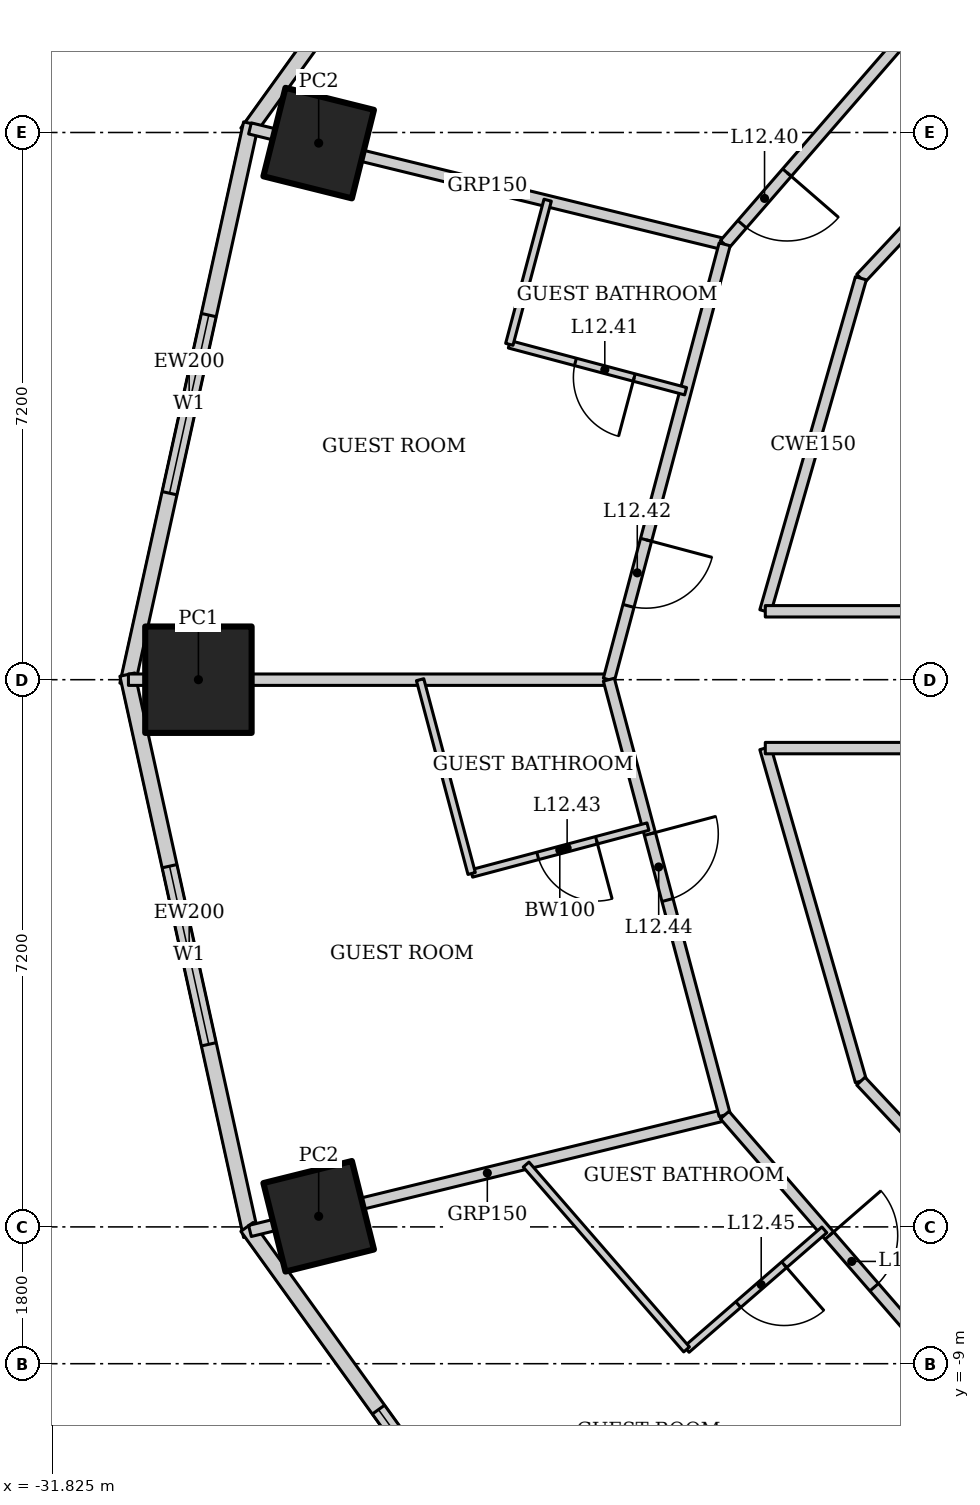
"""IFC4 building model, lengths in metres.
Left out: names, types, materials, properties, quantities, classifications, styles, units other than length and angle.
Written with IfcOpenShell. Run it as: python <this file> out.ifc"""

import sys

from ifc_helpers import new_model, si_unit, direction, frame, frame_2d, origin, origin_2d, place, context, subcontext, project, spatial, rectangle, hollow_rectangle, extrude, element, fill, save


model = new_model("IFC4")
c1 = context("Model", 3, precision=1e-05, world=origin(), true_north=direction((0.0, 1.0)))
c2 = subcontext(c1, "Body", "Model", "MODEL_VIEW")
j1 = project(units=[si_unit("LENGTHUNIT", "METRE"), si_unit("PLANEANGLEUNIT", "RADIAN")], contexts=[c1])
p1 = place(None, origin())
s1 = spatial("IfcSite", under=j1, at=p1, CompositionType="ELEMENT")
p2 = place(p1, origin())
s2 = spatial("IfcBuilding", under=s1, at=p2, CompositionType="ELEMENT")
p3 = place(p2, frame((0.0, 0.0, 58.6)))
s3 = spatial("IfcBuildingStorey", under=s2, at=p3, CompositionType="ELEMENT", Elevation=58.6)
p4 = place(p3, frame((-28.318, 7.06, 0.0), z_axis=(0.0, 0.0, 1.0), x_axis=(0.2419218956, 0.970295726276, 0.0)))
e1 = element("IfcColumn", 1, at=p4, inside=s3, PredefinedType="COLUMN", context=c2, shape_type="SweptSolid", body=[
    extrude(hollow_rectangle(XDim=1.2, YDim=1.2, WallThickness=0.1, at=origin_2d()), origin(), (0.0, 0.0, 1.0), 3.6),
])
p5 = place(p3, frame((-29.9, 0.0, 0.0), z_axis=(0.0, 0.0, 1.0), x_axis=(1.0, 0.0, 0.0)))
e2 = element("IfcColumn", 2, at=p5, inside=s3, PredefinedType="COLUMN", context=c2, shape_type="SweptSolid", body=[
    extrude(hollow_rectangle(XDim=1.4, YDim=1.4, WallThickness=0.1, at=origin_2d()), origin(), (0.0, 0.0, 1.0), 3.6),
])
p6 = place(p3, frame((-28.318, -7.06, 0.0), z_axis=(0.0, 0.0, 1.0), x_axis=(0.970295726276, 0.2419218956, 0.0)))
e3 = element("IfcColumn", 3, at=p6, inside=s3, PredefinedType="COLUMN", context=c2, shape_type="SweptSolid", body=[
    extrude(hollow_rectangle(XDim=1.2, YDim=1.2, WallThickness=0.1, at=origin_2d()), origin(), (0.0, 0.0, 1.0), 3.6),
])
p7 = place(p3, frame((-24.4, 13.957, 0.0), z_axis=(0.0, 0.0, 1.0), x_axis=(-0.583937613703, -0.811798536155, 0.0)))
e4 = element("IfcWall", 4, at=p7, inside=s3, PredefinedType="SOLIDWALL", context=c2, shape_type="SweptSolid", body=[
    extrude(rectangle(XDim=8.323, YDim=0.2, at=frame_2d((4.162, 0.0))), origin(), (0.0, 0.0, 1.0), 3.45),
])
p8 = place(p7, frame((2.961, 0.0, 0.5)))
e5 = element("IfcOpeningElement", 5, at=p8, cuts=e4, PredefinedType="OPENING", context=c2, shape_type="SweptSolid", body=[
    extrude(rectangle(XDim=2.4, YDim=2.2, at=frame_2d((1.2, 1.1))), frame((0.0, 0.11, 0.0), z_axis=(0.0, -1.0, 0.0), x_axis=(1.0, 0.0, 0.0)), (0.0, 0.0, 1.0), 0.22),
])
p9 = place(p3, frame((-29.208, 7.318, 0.0), z_axis=(0.0, 0.0, 1.0), x_axis=(-0.215238065514, -0.976561608478, 0.0)))
e6 = element("IfcWall", 6, at=p9, inside=s3, PredefinedType="SOLIDWALL", context=c2, shape_type="SweptSolid", body=[
    extrude(rectangle(XDim=7.562, YDim=0.2, at=frame_2d((3.781, 0.0))), origin(), (0.0, 0.0, 1.0), 3.45),
])
p10 = place(p9, frame((2.581, 0.0, 0.5)))
e7 = element("IfcOpeningElement", 7, at=p10, cuts=e6, PredefinedType="OPENING", context=c2, shape_type="SweptSolid", body=[
    extrude(rectangle(XDim=2.4, YDim=2.2, at=frame_2d((1.2, 1.1))), frame((0.0, 0.11, 0.0), z_axis=(0.0, -1.0, 0.0), x_axis=(1.0, 0.0, 0.0)), (0.0, 0.0, 1.0), 0.22),
])
p11 = place(p3, frame((-30.835, 0.067, 0.0), z_axis=(0.0, 0.0, 1.0), x_axis=(0.215238065514, -0.976561608478, 0.0)))
e8 = element("IfcWall", 8, at=p11, inside=s3, PredefinedType="SOLIDWALL", context=c2, shape_type="SweptSolid", body=[
    extrude(rectangle(XDim=7.562, YDim=0.2, at=frame_2d((3.781, 0.0))), origin(), (0.0, 0.0, 1.0), 3.45),
])
p12 = place(p11, frame((2.581, 0.0, 0.5)))
e9 = element("IfcOpeningElement", 9, at=p12, cuts=e8, PredefinedType="OPENING", context=c2, shape_type="SweptSolid", body=[
    extrude(rectangle(XDim=2.4, YDim=2.2, at=frame_2d((1.2, 1.1))), frame((0.0, 0.11, 0.0), z_axis=(0.0, -1.0, 0.0), x_axis=(1.0, 0.0, 0.0)), (0.0, 0.0, 1.0), 0.22),
])
p13 = place(p3, frame((-29.26, -7.2, 0.0), z_axis=(0.0, 0.0, 1.0), x_axis=(0.583937613703, -0.811798536155, 0.0)))
e10 = element("IfcWall", 10, at=p13, inside=s3, PredefinedType="SOLIDWALL", context=c2, shape_type="SweptSolid", body=[
    extrude(rectangle(XDim=8.323, YDim=0.2, at=frame_2d((4.162, 0.0))), origin(), (0.0, 0.0, 1.0), 3.45),
])
p14 = place(p13, frame((2.961, 0.0, 0.5)))
e11 = element("IfcOpeningElement", 11, at=p14, cuts=e10, PredefinedType="OPENING", context=c2, shape_type="SweptSolid", body=[
    extrude(rectangle(XDim=2.4, YDim=2.2, at=frame_2d((1.2, 1.1))), frame((0.0, 0.11, 0.0), z_axis=(0.0, -1.0, 0.0), x_axis=(1.0, 0.0, 0.0)), (0.0, 0.0, 1.0), 0.22),
])
p15 = place(p3, frame((-29.222, 7.254, 0.0), z_axis=(0.0, 0.0, 1.0), x_axis=(0.971456980633, -0.237215797913, 0.0)))
e12 = element("IfcWall", 12, at=p15, inside=s3, PredefinedType="PARTITIONING", context=c2, shape_type="SweptSolid", body=[
    extrude(rectangle(XDim=6.429, YDim=0.15, at=frame_2d((3.215, 0.0))), origin(), (0.0, 0.0, 1.0), 2.332),
])
p16 = place(p3, frame((-30.821, 0.0, 0.0), z_axis=(0.0, 0.0, 1.0), x_axis=(1.0, 0.0, 0.0)))
e13 = element("IfcWall", 13, at=p16, inside=s3, PredefinedType="PARTITIONING", context=c2, shape_type="SweptSolid", body=[
    extrude(rectangle(XDim=6.321, YDim=0.15, at=frame_2d((3.16, 0.0))), origin(), (0.0, 0.0, 1.0), 2.528),
])
p17 = place(p3, frame((-29.222, -7.254, 0.0), z_axis=(0.0, 0.0, 1.0), x_axis=(0.971456980633, 0.237215797913, 0.0)))
e14 = element("IfcWall", 14, at=p17, inside=s3, PredefinedType="PARTITIONING", context=c2, shape_type="SweptSolid", body=[
    extrude(rectangle(XDim=6.429, YDim=0.15, at=frame_2d((3.215, 0.0))), origin(), (0.0, 0.0, 1.0), 2.332),
])
p18 = place(p3, frame((-18.681, 10.675, 0.0), z_axis=(0.0, 0.0, 1.0), x_axis=(-0.655599989166, -0.755108372491, 0.0)))
e15 = element("IfcWall", 15, at=p18, inside=s3, PredefinedType="PARTITIONING", context=c2, shape_type="SweptSolid", body=[
    extrude(rectangle(XDim=6.551, YDim=0.15, at=frame_2d((3.275, 0.0))), origin(), (0.0, 0.0, 1.0), 3.45),
])
p19 = place(p18, frame((5.301, 0.0, 0.0)))
e16 = element("IfcOpeningElement", 16, at=p19, cuts=e15, PredefinedType="OPENING", context=c2, shape_type="SweptSolid", body=[
    extrude(rectangle(XDim=0.9, YDim=2.1, at=frame_2d((0.45, 1.05))), frame((0.0, 0.085, 0.0), z_axis=(0.0, -1.0, 0.0), x_axis=(1.0, 0.0, 0.0)), (0.0, 0.0, 1.0), 0.17),
])
p20 = place(p3, frame((-22.976, 5.729, 0.0), z_axis=(0.0, 0.0, 1.0), x_axis=(-0.257083265334, -0.966389256296, 0.0)))
e17 = element("IfcWall", 17, at=p20, inside=s3, PredefinedType="PARTITIONING", context=c2, shape_type="SweptSolid", body=[
    extrude(rectangle(XDim=5.928, YDim=0.15, at=frame_2d((2.964, 0.0))), origin(), (0.0, 0.0, 1.0), 3.45),
])
p21 = place(p20, frame((4.023, 0.0, 0.0)))
e18 = element("IfcOpeningElement", 18, at=p21, cuts=e17, PredefinedType="OPENING", context=c2, shape_type="SweptSolid", body=[
    extrude(rectangle(XDim=0.9, YDim=2.1, at=frame_2d((0.45, 1.05))), frame((0.0, 0.085, 0.0), z_axis=(0.0, -1.0, 0.0), x_axis=(1.0, 0.0, 0.0)), (0.0, 0.0, 1.0), 0.17),
])
p22 = place(p3, frame((-24.5, 0.0, 0.0), z_axis=(0.0, 0.0, 1.0), x_axis=(0.257083265334, -0.966389256296, 0.0)))
e19 = element("IfcWall", 19, at=p22, inside=s3, PredefinedType="PARTITIONING", context=c2, shape_type="SweptSolid", body=[
    extrude(rectangle(XDim=5.928, YDim=0.15, at=frame_2d((2.964, 0.0))), origin(), (0.0, 0.0, 1.0), 3.45),
])
p23 = place(p22, frame((2.1, 0.0, 0.0)))
e20 = element("IfcOpeningElement", 20, at=p23, cuts=e19, PredefinedType="OPENING", context=c2, shape_type="SweptSolid", body=[
    extrude(rectangle(XDim=0.9, YDim=2.1, at=frame_2d((0.45, 1.05))), frame((0.0, 0.085, 0.0), z_axis=(0.0, -1.0, 0.0), x_axis=(1.0, 0.0, 0.0)), (0.0, 0.0, 1.0), 0.17),
])
p24 = place(p3, frame((-22.976, -5.729, 0.0), z_axis=(0.0, 0.0, 1.0), x_axis=(0.655599989166, -0.755108372491, 0.0)))
e21 = element("IfcWall", 21, at=p24, inside=s3, PredefinedType="PARTITIONING", context=c2, shape_type="SweptSolid", body=[
    extrude(rectangle(XDim=6.551, YDim=0.15, at=frame_2d((3.275, 0.0))), origin(), (0.0, 0.0, 1.0), 3.45),
])
p25 = place(p24, frame((2.1, 0.0, 0.0)))
e22 = element("IfcOpeningElement", 22, at=p25, cuts=e21, PredefinedType="OPENING", context=c2, shape_type="SweptSolid", body=[
    extrude(rectangle(XDim=0.9, YDim=2.1, at=frame_2d((0.45, 1.05))), frame((0.0, 0.085, 0.0), z_axis=(0.0, -1.0, 0.0), x_axis=(1.0, 0.0, 0.0)), (0.0, 0.0, 1.0), 0.17),
])
p26 = place(p3, frame((-17.021, 9.726, 0.0), z_axis=(0.0, 0.0, 1.0), x_axis=(-0.68365836236, -0.729802194828, 0.0)))
e23 = element("IfcWall", 23, at=p26, inside=s3, PredefinedType="PARTITIONING", context=c2, shape_type="SweptSolid", body=[
    extrude(rectangle(XDim=6.09, YDim=0.15, at=frame_2d((3.045, 0.0))), origin(), (0.0, 0.0, 1.0), 3.45),
])
p27 = place(p26, frame((2.545, 0.0, 0.0)))
e24 = element("IfcOpeningElement", 24, at=p27, cuts=e23, PredefinedType="OPENING", context=c2, shape_type="SweptSolid", body=[
    extrude(rectangle(XDim=1.0, YDim=2.1, at=frame_2d((0.5, 1.05))), frame((0.0, 0.085, 0.0), z_axis=(0.0, -1.0, 0.0), x_axis=(1.0, 0.0, 0.0)), (0.0, 0.0, 1.0), 0.17),
])
for number, where, z_axis, x_axis in (
    (25, (-21.184, 5.282, 0.0), (0.0, 0.0, 1.0), (-0.276, -0.961, 0.0)),
    (26, (-22.442, -0.9, 0.0), (0.0, 0.0, 1.0), (0.276, -0.961, 0.0)),
):
    element("IfcWall", number, at=place(p3, frame(where, z_axis=z_axis, x_axis=x_axis)), inside=s3, PredefinedType="PARTITIONING", context=c2, shape_type="SweptSolid", body=[
        extrude(rectangle(XDim=4.559, YDim=0.15, at=frame_2d((2.279, 0.0))), origin(), (0.0, 0.0, 1.0), 3.45),
    ])
p28 = place(p3, frame((-21.184, -5.282, 0.0), z_axis=(0.0, 0.0, 1.0), x_axis=(0.68365836236, -0.729802194828, 0.0)))
e27 = element("IfcWall", 27, at=p28, inside=s3, PredefinedType="PARTITIONING", context=c2, shape_type="SweptSolid", body=[
    extrude(rectangle(XDim=6.09, YDim=0.15, at=frame_2d((3.045, 0.0))), origin(), (0.0, 0.0, 1.0), 3.45),
])
p29 = place(p28, frame((2.545, 0.0, 0.0)))
e28 = element("IfcOpeningElement", 28, at=p29, cuts=e27, PredefinedType="OPENING", context=c2, shape_type="SweptSolid", body=[
    extrude(rectangle(XDim=1.0, YDim=2.1, at=frame_2d((0.5, 1.05))), frame((0.0, 0.085, 0.0), z_axis=(0.0, -1.0, 0.0), x_axis=(1.0, 0.0, 0.0)), (0.0, 0.0, 1.0), 0.17),
])
p30 = place(p3, frame((-23.49, 3.796, 0.0), z_axis=(0.0, 0.0, 1.0), x_axis=(-0.96639514992, 0.257061109879, 0.0)))
e29 = element("IfcWall", 29, at=p30, inside=s3, PredefinedType="PARTITIONING", context=c2, shape_type="SweptSolid", body=[
    extrude(rectangle(XDim=2.4, YDim=0.1, at=frame_2d((1.2, 0.0))), origin(), (0.0, 0.0, 1.0), 3.45),
])
p31 = place(p30, frame((0.7, 0.0, 0.0)))
e30 = element("IfcOpeningElement", 30, at=p31, cuts=e29, PredefinedType="OPENING", context=c2, shape_type="SweptSolid", body=[
    extrude(rectangle(XDim=0.8, YDim=2.1, at=frame_2d((0.4, 1.05))), frame((0.0, 0.06, 0.0), z_axis=(0.0, -1.0, 0.0), x_axis=(1.0, 0.0, 0.0)), (0.0, 0.0, 1.0), 0.12),
])
p32 = place(p3, frame((-25.81, 4.413, 0.0), z_axis=(0.0, 0.0, 1.0), x_axis=(0.257143831715, 0.96637314212, 0.0)))
e31 = element("IfcWall", 31, at=p32, inside=s3, PredefinedType="PARTITIONING", context=c2, shape_type="SweptSolid", body=[
    extrude(rectangle(XDim=1.962, YDim=0.1, at=frame_2d((0.981, 0.0))), origin(), (0.0, 0.0, 1.0), 3.45),
])
p33 = place(p3, frame((-23.986, -1.933, 0.0), z_axis=(0.0, 0.0, 1.0), x_axis=(-0.96639514992, -0.257061109879, 0.0)))
e32 = element("IfcWall", 32, at=p33, inside=s3, PredefinedType="PARTITIONING", context=c2, shape_type="SweptSolid", body=[
    extrude(rectangle(XDim=2.4, YDim=0.1, at=frame_2d((1.2, 0.0))), origin(), (0.0, 0.0, 1.0), 3.45),
])
p34 = place(p33, frame((0.7, 0.0, 0.0)))
e33 = element("IfcOpeningElement", 33, at=p34, cuts=e32, PredefinedType="OPENING", context=c2, shape_type="SweptSolid", body=[
    extrude(rectangle(XDim=0.8, YDim=2.1, at=frame_2d((0.4, 1.05))), frame((0.0, 0.06, 0.0), z_axis=(0.0, -1.0, 0.0), x_axis=(1.0, 0.0, 0.0)), (0.0, 0.0, 1.0), 0.12),
])
p35 = place(p3, frame((-26.305, -2.55, 0.0), z_axis=(0.0, 0.0, 1.0), x_axis=(-0.257052122515, 0.966397540513, 0.0)))
e34 = element("IfcWall", 34, at=p35, inside=s3, PredefinedType="PARTITIONING", context=c2, shape_type="SweptSolid", body=[
    extrude(rectangle(XDim=2.638, YDim=0.1, at=frame_2d((1.319, 0.0))), origin(), (0.0, 0.0, 1.0), 3.45),
])
p36 = place(p3, frame((-21.665, -7.239, 0.0), z_axis=(0.0, 0.0, 1.0), x_axis=(-0.755098052661, -0.655611875172, 0.0)))
e35 = element("IfcWall", 35, at=p36, inside=s3, PredefinedType="PARTITIONING", context=c2, shape_type="SweptSolid", body=[
    extrude(rectangle(XDim=2.4, YDim=0.1, at=frame_2d((1.2, 0.0))), origin(), (0.0, 0.0, 1.0), 3.45),
])
p37 = place(p36, frame((0.7, 0.0, 0.0)))
e36 = element("IfcOpeningElement", 36, at=p37, cuts=e35, PredefinedType="OPENING", context=c2, shape_type="SweptSolid", body=[
    extrude(rectangle(XDim=0.8, YDim=2.1, at=frame_2d((0.4, 1.05))), frame((0.0, 0.06, 0.0), z_axis=(0.0, -1.0, 0.0), x_axis=(1.0, 0.0, 0.0)), (0.0, 0.0, 1.0), 0.12),
])
p38 = place(p3, frame((-23.477, -8.812, 0.0), z_axis=(0.0, 0.0, 1.0), x_axis=(-0.655596826012, 0.755111118792, 0.0)))
e37 = element("IfcWall", 37, at=p38, inside=s3, PredefinedType="PARTITIONING", context=c2, shape_type="SweptSolid", body=[
    extrude(rectangle(XDim=3.221, YDim=0.1, at=frame_2d((1.611, 0.0))), origin(), (0.0, 0.0, 1.0), 3.45),
])
for number, where, z_axis, x_axis in (
    (38, (-19.835, -0.9, 0.0), (0.0, 0.0, 1.0), (-1.0, 0.0, 0.0)),
    (39, (-19.835, 0.9, 0.0), (0.0, 0.0, 1.0), (-1.0, 0.0, 0.0)),
):
    element("IfcWall", number, at=place(p3, frame(where, z_axis=z_axis, x_axis=x_axis)), inside=s3, PredefinedType="PARTITIONING", context=c2, shape_type="SweptSolid", body=[
        extrude(rectangle(XDim=2.607, YDim=0.15, at=frame_2d((1.303, 0.0))), origin(), (0.0, 0.0, 1.0), 3.45),
    ])
p39 = place(p10, origin())
e40 = element("IfcWindow", 40, at=p39, inside=s3, PartitioningType="SINGLE_PANEL", PredefinedType="WINDOW", context=c2, shape_type="SweptSolid", body=[
    extrude(rectangle(XDim=2.4, YDim=2.2, at=frame_2d((1.2, 1.1))), frame((0.0, 0.03, 0.0), z_axis=(0.0, -1.0, 0.0), x_axis=(1.0, 0.0, 0.0)), (0.0, 0.0, 1.0), 0.06),
])
fill(e7, e40)
p40 = place(p12, origin())
e41 = element("IfcWindow", 41, at=p40, inside=s3, PartitioningType="SINGLE_PANEL", PredefinedType="WINDOW", context=c2, shape_type="SweptSolid", body=[
    extrude(rectangle(XDim=2.4, YDim=2.2, at=frame_2d((1.2, 1.1))), frame((0.0, 0.03, 0.0), z_axis=(0.0, -1.0, 0.0), x_axis=(1.0, 0.0, 0.0)), (0.0, 0.0, 1.0), 0.06),
])
fill(e9, e41)
p41 = place(p14, origin())
e42 = element("IfcWindow", 42, at=p41, inside=s3, PartitioningType="SINGLE_PANEL", PredefinedType="WINDOW", context=c2, shape_type="SweptSolid", body=[
    extrude(rectangle(XDim=2.4, YDim=2.2, at=frame_2d((1.2, 1.1))), frame((0.0, 0.03, 0.0), z_axis=(0.0, -1.0, 0.0), x_axis=(1.0, 0.0, 0.0)), (0.0, 0.0, 1.0), 0.06),
])
fill(e11, e42)
p42 = place(p19, origin())
e43 = element("IfcDoor", 43, at=p42, inside=s3, OperationType="SINGLE_SWING_LEFT", PredefinedType="DOOR", context=c2, shape_type="SweptSolid", body=[
    extrude(rectangle(XDim=0.9, YDim=2.1, at=frame_2d((0.45, 1.05))), frame((0.0, 0.025, 0.0), z_axis=(0.0, -1.0, 0.0), x_axis=(1.0, 0.0, 0.0)), (0.0, 0.0, 1.0), 0.05),
])
fill(e16, e43)
p43 = place(p31, origin())
e44 = element("IfcDoor", 44, at=p43, inside=s3, OperationType="SINGLE_SWING_LEFT", PredefinedType="DOOR", context=c2, shape_type="SweptSolid", body=[
    extrude(rectangle(XDim=0.8, YDim=2.1, at=frame_2d((0.4, 1.05))), frame((0.0, 0.025, 0.0), z_axis=(0.0, -1.0, 0.0), x_axis=(1.0, 0.0, 0.0)), (0.0, 0.0, 1.0), 0.05),
])
fill(e30, e44)
p44 = place(p21, origin())
e45 = element("IfcDoor", 45, at=p44, inside=s3, OperationType="SINGLE_SWING_LEFT", PredefinedType="DOOR", context=c2, shape_type="SweptSolid", body=[
    extrude(rectangle(XDim=0.9, YDim=2.1, at=frame_2d((0.45, 1.05))), frame((0.0, 0.025, 0.0), z_axis=(0.0, -1.0, 0.0), x_axis=(1.0, 0.0, 0.0)), (0.0, 0.0, 1.0), 0.05),
])
fill(e18, e45)
p45 = place(p34, origin())
e46 = element("IfcDoor", 46, at=p45, inside=s3, OperationType="SINGLE_SWING_LEFT", PredefinedType="DOOR", context=c2, shape_type="SweptSolid", body=[
    extrude(rectangle(XDim=0.8, YDim=2.1, at=frame_2d((0.4, 1.05))), frame((0.0, 0.025, 0.0), z_axis=(0.0, -1.0, 0.0), x_axis=(1.0, 0.0, 0.0)), (0.0, 0.0, 1.0), 0.05),
])
fill(e33, e46)
p46 = place(p23, origin())
e47 = element("IfcDoor", 47, at=p46, inside=s3, OperationType="SINGLE_SWING_LEFT", PredefinedType="DOOR", context=c2, shape_type="SweptSolid", body=[
    extrude(rectangle(XDim=0.9, YDim=2.1, at=frame_2d((0.45, 1.05))), frame((0.0, 0.025, 0.0), z_axis=(0.0, -1.0, 0.0), x_axis=(1.0, 0.0, 0.0)), (0.0, 0.0, 1.0), 0.05),
])
fill(e20, e47)
p47 = place(p37, origin())
e48 = element("IfcDoor", 48, at=p47, inside=s3, OperationType="SINGLE_SWING_LEFT", PredefinedType="DOOR", context=c2, shape_type="SweptSolid", body=[
    extrude(rectangle(XDim=0.8, YDim=2.1, at=frame_2d((0.4, 1.05))), frame((0.0, 0.025, 0.0), z_axis=(0.0, -1.0, 0.0), x_axis=(1.0, 0.0, 0.0)), (0.0, 0.0, 1.0), 0.05),
])
fill(e36, e48)
p48 = place(p25, origin())
e49 = element("IfcDoor", 49, at=p48, inside=s3, OperationType="SINGLE_SWING_LEFT", PredefinedType="DOOR", context=c2, shape_type="SweptSolid", body=[
    extrude(rectangle(XDim=0.9, YDim=2.1, at=frame_2d((0.45, 1.05))), frame((0.0, 0.025, 0.0), z_axis=(0.0, -1.0, 0.0), x_axis=(1.0, 0.0, 0.0)), (0.0, 0.0, 1.0), 0.05),
])
fill(e22, e49)
save(model, sys.argv[1])
